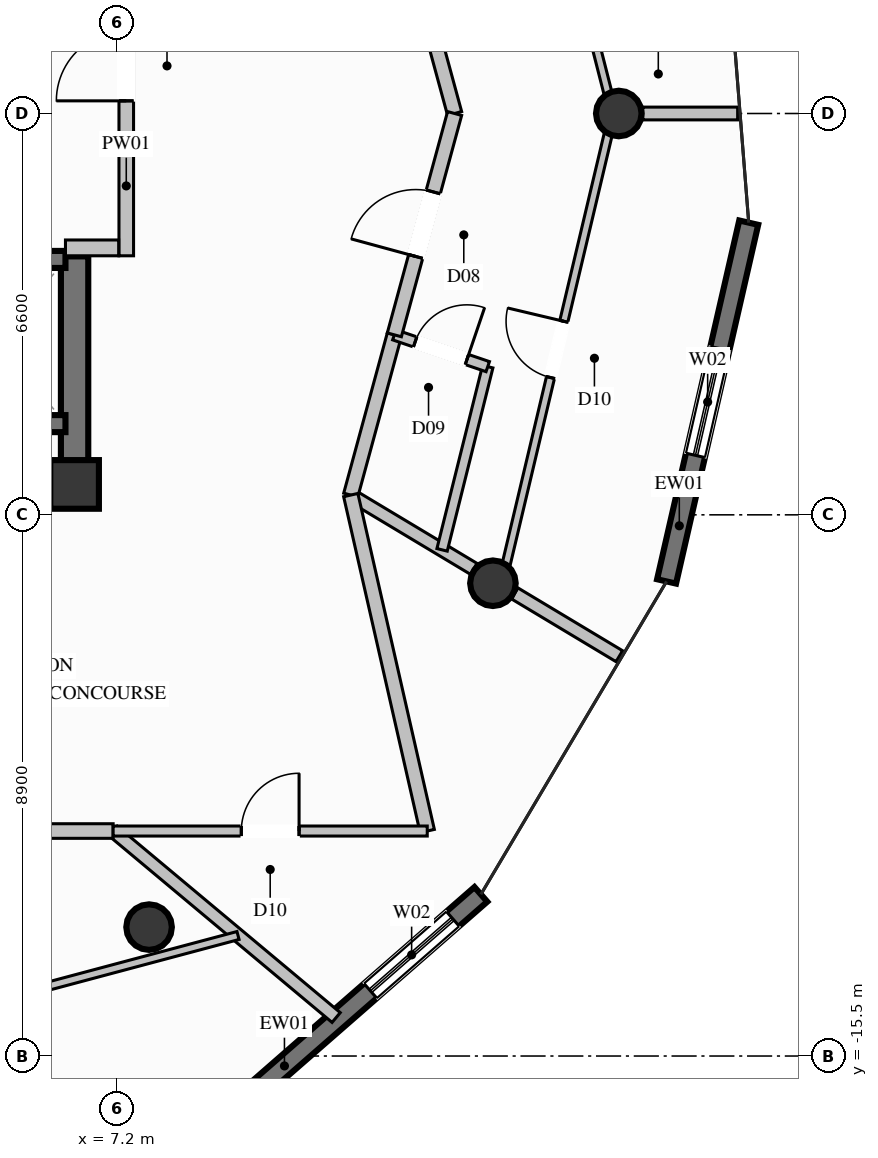
"""IFC4 building model, lengths in metres.
Left out: names, types, materials, properties, quantities, classifications, styles, units other than length and angle.
Written with IfcOpenShell. Run it as: python <this file> out.ifc"""

import sys

from ifc_helpers import new_model, si_unit, direction, frame, frame_2d, origin, origin_2d, place, context, subcontext, project, spatial, rectangle, circle, extrude, element, fill, save


model = new_model("IFC4")
c1 = context("Model", 3, precision=1e-05, world=origin(), true_north=direction((0.0, 1.0)))
c2 = subcontext(c1, "Body", "Model", "MODEL_VIEW")
j1 = project(units=[si_unit("LENGTHUNIT", "METRE"), si_unit("PLANEANGLEUNIT", "RADIAN")], contexts=[c1])
p1 = place(None, origin())
s1 = spatial("IfcSite", under=j1, at=p1, CompositionType="ELEMENT")
p2 = place(p1, origin())
s2 = spatial("IfcBuilding", under=s1, at=p2, CompositionType="ELEMENT")
p3 = place(p2, frame((0.0, 0.0, 246.8)))
s3 = spatial("IfcBuildingStorey", under=s2, at=p3, CompositionType="ELEMENT", Elevation=246.8)
p4 = place(p3, frame((6.5, -6.1, 0.0), z_axis=(0.0, 0.0, 1.0), x_axis=(1.0, 0.0, 0.0)))
e1 = element("IfcColumn", 1, at=p4, inside=s3, PredefinedType="COLUMN", context=c2, shape_type="SweptSolid", body=[
    extrude(rectangle(XDim=0.8, YDim=0.8, at=origin_2d()), origin(), (0.0, 0.0, 1.0), 3.8),
])
p5 = place(p3, frame((4.15, -6.1, 0.0), z_axis=(0.0, 0.0, 1.0), x_axis=(1.0, 0.0, 0.0)))
e2 = element("IfcWall", 2, at=p5, inside=s3, PredefinedType="SHEAR", context=c2, shape_type="SweptSolid", body=[
    extrude(rectangle(XDim=2.125, YDim=0.45, at=frame_2d((1.062, 0.0))), origin(), (0.0, 0.0, 1.0), 3.8),
])
p6 = place(p3, frame((6.5, -6.325, 0.0), z_axis=(0.0, 0.0, 1.0), x_axis=(0.0, 1.0, 0.0)))
e3 = element("IfcWall", 3, at=p6, inside=s3, PredefinedType="SHEAR", context=c2, shape_type="SweptSolid", body=[
    extrude(rectangle(XDim=3.975, YDim=0.45, at=frame_2d((1.987, 0.0))), origin(), (0.0, 0.0, 1.0), 3.8),
])
for number, where, z_axis, x_axis in (
    (4, (15.45, 0.0, 0.0), (0.0, 0.0, 1.0), (1.0, 0.0, 0.0)),
    (5, (7.725, -13.38, 0.0), (0.0, 0.0, 1.0), (1.0, 0.0, 0.0)),
    (6, (13.38, -7.725, 0.0), (0.0, 0.0, 1.0), (1.0, 0.0, 0.0)),
):
    element("IfcColumn", number, at=place(p3, frame(where, z_axis=z_axis, x_axis=x_axis)), inside=s3, PredefinedType="COLUMN", context=c2, shape_type="SweptSolid", body=[
        extrude(circle(Radius=0.375, at=origin_2d()), origin(), (0.0, 0.0, 1.0), 3.8),
    ])
p7 = place(p3, frame((13.182, -12.842, 0.0), z_axis=(0.0, 0.0, 1.0), x_axis=(-0.753243589512, -0.657741662706, 0.0)))
e7 = element("IfcWall", 7, at=p7, inside=s3, PredefinedType="SOLIDWALL", context=c2, shape_type="SweptSolid", body=[
    extrude(rectangle(XDim=5.916, YDim=0.32, at=frame_2d((2.958, 0.0))), origin(), (0.0, 0.0, 1.0), 3.57),
])
p8 = place(p7, frame((0.612, 0.0, 0.35)))
e8 = element("IfcOpeningElement", 8, at=p8, cuts=e7, PredefinedType="OPENING", context=c2, shape_type="SweptSolid", body=[
    extrude(rectangle(XDim=1.8, YDim=2.6, at=frame_2d((0.9, 1.3))), frame((0.0, 0.17, 0.0), z_axis=(0.0, -1.0, 0.0), x_axis=(1.0, 0.0, 0.0)), (0.0, 0.0, 1.0), 0.34),
])
p9 = place(p3, frame((17.587, -1.795, 0.0), z_axis=(0.0, 0.0, 1.0), x_axis=(-0.223174159959, -0.974778587335, 0.0)))
e9 = element("IfcWall", 9, at=p9, inside=s3, PredefinedType="SOLIDWALL", context=c2, shape_type="SweptSolid", body=[
    extrude(rectangle(XDim=6.053, YDim=0.32, at=frame_2d((3.026, 0.0))), origin(), (0.0, 0.0, 1.0), 3.57),
])
p10 = place(p9, frame((2.126, 0.0, 0.35)))
e10 = element("IfcOpeningElement", 10, at=p10, cuts=e9, PredefinedType="OPENING", context=c2, shape_type="SweptSolid", body=[
    extrude(rectangle(XDim=1.8, YDim=2.6, at=frame_2d((0.9, 1.3))), frame((0.0, 0.17, 0.0), z_axis=(0.0, -1.0, 0.0), x_axis=(1.0, 0.0, 0.0)), (0.0, 0.0, 1.0), 0.34),
])
p11 = place(p3, frame((4.15, -5.1, 0.0), z_axis=(0.0, 0.0, 1.0), x_axis=(1.0, 0.0, 0.0)))
e11 = element("IfcWall", 11, at=p11, inside=s3, PredefinedType="SOLIDWALL", context=c2, shape_type="SweptSolid", body=[
    extrude(rectangle(XDim=2.2, YDim=0.28, at=frame_2d((1.1, 0.0))), origin(), (0.0, 0.0, 1.0), 3.57),
])
p12 = place(p3, frame((6.35, -2.4, 0.0), z_axis=(0.0, 0.0, 1.0), x_axis=(-1.0, 0.0, 0.0)))
e12 = element("IfcWall", 12, at=p12, inside=s3, PredefinedType="SOLIDWALL", context=c2, shape_type="SweptSolid", body=[
    extrude(rectangle(XDim=2.2, YDim=0.28, at=frame_2d((1.1, 0.0))), origin(), (0.0, 0.0, 1.0), 3.57),
])
p13 = place(p12, frame((0.5, 0.0, 0.0)))
e13 = element("IfcOpeningElement", 13, at=p13, cuts=e12, PredefinedType="OPENING", context=c2, shape_type="SweptSolid", body=[
    extrude(rectangle(XDim=1.2, YDim=2.2, at=frame_2d((0.6, 1.1))), frame((0.0, 0.15, 0.0), z_axis=(0.0, -1.0, 0.0), x_axis=(1.0, 0.0, 0.0)), (0.0, 0.0, 1.0), 0.3),
])
p14 = place(p3, frame((7.35, -2.34, 0.0), z_axis=(0.0, 0.0, 1.0), x_axis=(0.0, 1.0, 0.0)))
e14 = element("IfcWall", 14, at=p14, inside=s3, PredefinedType="PARTITIONING", context=c2, shape_type="SweptSolid", body=[
    extrude(rectangle(XDim=5.07, YDim=0.24, at=frame_2d((2.535, 0.0))), origin(), (0.0, 0.0, 1.0), 2.655),
])
p15 = place(p14, frame((2.548, 0.0, 0.0)))
e15 = element("IfcOpeningElement", 15, at=p15, cuts=e14, PredefinedType="OPENING", context=c2, shape_type="SweptSolid", body=[
    extrude(rectangle(XDim=1.15, YDim=2.2, at=frame_2d((0.575, 1.1))), frame((0.0, 0.13, 0.0), z_axis=(0.0, -1.0, 0.0), x_axis=(1.0, 0.0, 0.0)), (0.0, 0.0, 1.0), 0.26),
])
p16 = place(p3, frame((6.35, -2.21, 0.0), z_axis=(0.0, 0.0, 1.0), x_axis=(1.0, 0.0, 0.0)))
e16 = element("IfcWall", 16, at=p16, inside=s3, PredefinedType="PARTITIONING", context=c2, shape_type="SweptSolid", body=[
    extrude(rectangle(XDim=0.875, YDim=0.26, at=frame_2d((0.438, 0.0))), origin(), (0.0, 0.0, 1.0), 3.57),
])
p17 = place(p3, frame((11.042, -6.275, 0.0), z_axis=(0.0, 0.0, 1.0), x_axis=(0.857502061287, -0.514480529164, 0.0)))
e17 = element("IfcWall", 17, at=p17, inside=s3, PredefinedType="PARTITIONING", context=c2, shape_type="SweptSolid", body=[
    extrude(rectangle(XDim=2.358, YDim=0.21, at=frame_2d((1.179, 0.0))), origin(), (0.0, 0.0, 1.0), 3.011),
])
p18 = place(p3, frame((13.738, -7.892, 0.0), z_axis=(0.0, 0.0, 1.0), x_axis=(0.857407053578, -0.514638848587, 0.0)))
e18 = element("IfcWall", 18, at=p18, inside=s3, PredefinedType="PARTITIONING", context=c2, shape_type="SweptSolid", body=[
    extrude(rectangle(XDim=2.007, YDim=0.21, at=frame_2d((1.003, 0.0))), origin(), (0.0, 0.0, 1.0), 3.57),
])
p19 = place(p3, frame((11.042, -6.275, 0.0), z_axis=(0.0, 0.0, 1.0), x_axis=(0.262572701387, 0.964912211803, 0.0)))
e19 = element("IfcWall", 19, at=p19, inside=s3, PredefinedType="PARTITIONING", context=c2, shape_type="SweptSolid", body=[
    extrude(rectangle(XDim=2.731, YDim=0.24, at=frame_2d((1.365, 0.0))), origin(), (0.0, 0.0, 1.0), 3.57),
])
p20 = place(p3, frame((12.544, -7.176, 0.0), z_axis=(0.0, 0.0, 1.0), x_axis=(0.241851063072, 0.970313384062, 0.0)))
e20 = element("IfcWall", 20, at=p20, inside=s3, PredefinedType="PLUMBINGWALL", context=c2, shape_type="SweptSolid", body=[
    extrude(rectangle(XDim=3.105, YDim=0.175, at=frame_2d((1.553, 0.0))), origin(), (0.0, 0.0, 1.0), 3.57),
])
p21 = place(p3, frame((11.759, -3.64, 0.0), z_axis=(0.0, 0.0, 1.0), x_axis=(0.946586404748, -0.322450272671, 0.0)))
e21 = element("IfcWall", 21, at=p21, inside=s3, PredefinedType="PLUMBINGWALL", context=c2, shape_type="SweptSolid", body=[
    extrude(rectangle(XDim=1.623, YDim=0.175, at=frame_2d((0.811, 0.0))), origin(), (0.0, 0.0, 1.0), 3.57),
])
p22 = place(p21, frame((0.361, 0.0, 0.0)))
e22 = element("IfcOpeningElement", 22, at=p22, cuts=e21, PredefinedType="OPENING", context=c2, shape_type="SweptSolid", body=[
    extrude(rectangle(XDim=0.9, YDim=2.1, at=frame_2d((0.45, 1.05))), frame((0.0, 0.098, 0.0), z_axis=(0.0, -1.0, 0.0), x_axis=(1.0, 0.0, 0.0)), (0.0, 0.0, 1.0), 0.195),
])
p23 = place(p3, frame((15.845, 0.0, 0.0), z_axis=(0.0, 0.0, 1.0), x_axis=(1.0, 0.0, 0.0)))
e23 = element("IfcWall", 23, at=p23, inside=s3, PredefinedType="PARTITIONING", context=c2, shape_type="SweptSolid", body=[
    extrude(rectangle(XDim=1.56, YDim=0.21, at=frame_2d((0.78, 0.0))), origin(), (0.0, 0.0, 1.0), 3.57),
])
p24 = place(p3, frame((12.75, 0.0, 0.0), z_axis=(0.0, 0.0, 1.0), x_axis=(-0.262640884433, 0.964893655189, 0.0)))
e24 = element("IfcWall", 24, at=p24, inside=s3, PredefinedType="PARTITIONING", context=c2, shape_type="SweptSolid", body=[
    extrude(rectangle(XDim=6.503, YDim=0.24, at=frame_2d((3.251, 0.0))), origin(), (0.0, 0.0, 1.0), 3.57),
])
p25 = place(p3, frame((11.759, -3.64, 0.0), z_axis=(0.0, 0.0, 1.0), x_axis=(0.2626902414, 0.964880219029, 0.0)))
e25 = element("IfcWall", 25, at=p25, inside=s3, PredefinedType="PARTITIONING", context=c2, shape_type="SweptSolid", body=[
    extrude(rectangle(XDim=3.772, YDim=0.24, at=frame_2d((1.886, 0.0))), origin(), (0.0, 0.0, 1.0), 3.57),
])
p26 = place(p25, frame((1.336, 0.0, 0.0)))
e26 = element("IfcOpeningElement", 26, at=p26, cuts=e25, PredefinedType="OPENING", context=c2, shape_type="SweptSolid", body=[
    extrude(rectangle(XDim=1.1, YDim=2.3, at=frame_2d((0.55, 1.15))), frame((0.0, 0.13, 0.0), z_axis=(0.0, -1.0, 0.0), x_axis=(1.0, 0.0, 0.0)), (0.0, 0.0, 1.0), 0.26),
])
p27 = place(p3, frame((13.516, -7.759, 0.0), z_axis=(0.0, 0.0, 1.0), x_axis=(0.230840940032, 0.972991500685, 0.0)))
e27 = element("IfcWall", 27, at=p27, inside=s3, PredefinedType="PARTITIONING", context=c2, shape_type="SweptSolid", body=[
    extrude(rectangle(XDim=7.974, YDim=0.135, at=frame_2d((3.987, 0.0))), origin(), (0.0, 0.0, 1.0), 3.139),
])
p28 = place(p27, frame((3.512, 0.0, 0.0)))
e28 = element("IfcOpeningElement", 28, at=p28, cuts=e27, PredefinedType="OPENING", context=c2, shape_type="SweptSolid", body=[
    extrude(rectangle(XDim=0.95, YDim=2.1, at=frame_2d((0.475, 1.05))), frame((0.0, 0.078, 0.0), z_axis=(0.0, -1.0, 0.0), x_axis=(1.0, 0.0, 0.0)), (0.0, 0.0, 1.0), 0.155),
])
p29 = place(p3, frame((15.357, 0.0, 0.0), z_axis=(0.0, 0.0, 1.0), x_axis=(-0.246948201866, 0.969028681513, 0.0)))
e29 = element("IfcWall", 29, at=p29, inside=s3, PredefinedType="PARTITIONING", context=c2, shape_type="SweptSolid", body=[
    extrude(rectangle(XDim=7.937, YDim=0.135, at=frame_2d((3.968, 0.0))), origin(), (0.0, 0.0, 1.0), 3.139),
])
p30 = place(p29, frame((3.493, 0.0, 0.0)))
e30 = element("IfcOpeningElement", 30, at=p30, cuts=e29, PredefinedType="OPENING", context=c2, shape_type="SweptSolid", body=[
    extrude(rectangle(XDim=0.95, YDim=2.1, at=frame_2d((0.475, 1.05))), frame((0.0, 0.078, 0.0), z_axis=(0.0, -1.0, 0.0), x_axis=(1.0, 0.0, 0.0)), (0.0, 0.0, 1.0), 0.155),
])
p31 = place(p3, frame((7.134, -11.8, 0.0), z_axis=(0.0, 0.0, 1.0), x_axis=(0.767165499913, -0.641449215249, 0.0)))
e31 = element("IfcWall", 31, at=p31, inside=s3, PredefinedType="PARTITIONING", context=c2, shape_type="SweptSolid", body=[
    extrude(rectangle(XDim=4.781, YDim=0.21, at=frame_2d((2.391, 0.0))), origin(), (0.0, 0.0, 1.0), 3.57),
])
p32 = place(p3, frame((0.0, -11.8, 0.0), z_axis=(0.0, 0.0, 1.0), x_axis=(1.0, 0.0, 0.0)))
e32 = element("IfcWall", 32, at=p32, inside=s3, PredefinedType="PARTITIONING", context=c2, shape_type="SweptSolid", body=[
    extrude(rectangle(XDim=7.134, YDim=0.24, at=frame_2d((3.567, 0.0))), origin(), (0.0, 0.0, 1.0), 3.57),
])
p33 = place(p3, frame((0.225, -15.91, 0.0), z_axis=(0.0, 0.0, 1.0), x_axis=(0.966188184598, 0.25783791797, 0.0)))
e33 = element("IfcWall", 33, at=p33, inside=s3, PredefinedType="PARTITIONING", context=c2, shape_type="SweptSolid", body=[
    extrude(rectangle(XDim=9.277, YDim=0.135, at=frame_2d((4.638, 0.0))), origin(), (0.0, 0.0, 1.0), 3.139),
])
p34 = place(p33, frame((4.163, 0.0, 0.0)))
e34 = element("IfcOpeningElement", 34, at=p34, cuts=e33, PredefinedType="OPENING", context=c2, shape_type="SweptSolid", body=[
    extrude(rectangle(XDim=0.95, YDim=2.1, at=frame_2d((0.475, 1.05))), frame((0.0, 0.078, 0.0), z_axis=(0.0, -1.0, 0.0), x_axis=(1.0, 0.0, 0.0)), (0.0, 0.0, 1.0), 0.155),
])
p35 = place(p3, frame((12.3, -11.8, 0.0), z_axis=(0.0, 0.0, 1.0), x_axis=(-0.222014008723, 0.975043475918, 0.0)))
e35 = element("IfcWall", 35, at=p35, inside=s3, PredefinedType="PARTITIONING", context=c2, shape_type="SweptSolid", body=[
    extrude(rectangle(XDim=5.667, YDim=0.24, at=frame_2d((2.833, 0.0))), origin(), (0.0, 0.0, 1.0), 3.57),
])
p36 = place(p3, frame((7.134, -11.8, 0.0), z_axis=(0.0, 0.0, 1.0), x_axis=(1.0, 0.0, 0.0)))
e36 = element("IfcWall", 36, at=p36, inside=s3, PredefinedType="PARTITIONING", context=c2, shape_type="SweptSolid", body=[
    extrude(rectangle(XDim=5.166, YDim=0.165, at=frame_2d((2.583, 0.0))), origin(), (0.0, 0.0, 1.0), 3.57),
])
p37 = place(p36, frame((2.108, 0.0, 0.0)))
e37 = element("IfcOpeningElement", 37, at=p37, cuts=e36, PredefinedType="OPENING", context=c2, shape_type="SweptSolid", body=[
    extrude(rectangle(XDim=0.95, YDim=2.1, at=frame_2d((0.475, 1.05))), frame((0.0, 0.093, 0.0), z_axis=(0.0, -1.0, 0.0), x_axis=(1.0, 0.0, 0.0)), (0.0, 0.0, 1.0), 0.185),
])
p38 = place(p8, origin())
e38 = element("IfcWindow", 38, at=p38, inside=s3, PartitioningType="SINGLE_PANEL", PredefinedType="WINDOW", context=c2, shape_type="SweptSolid", body=[
    extrude(rectangle(XDim=1.8, YDim=2.6, at=frame_2d((0.9, 1.3))), frame((0.0, 0.03, 0.0), z_axis=(0.0, -1.0, 0.0), x_axis=(1.0, 0.0, 0.0)), (0.0, 0.0, 1.0), 0.06),
])
fill(e8, e38)
p39 = place(p10, origin())
e39 = element("IfcWindow", 39, at=p39, inside=s3, PartitioningType="SINGLE_PANEL", PredefinedType="WINDOW", context=c2, shape_type="SweptSolid", body=[
    extrude(rectangle(XDim=1.8, YDim=2.6, at=frame_2d((0.9, 1.3))), frame((0.0, 0.03, 0.0), z_axis=(0.0, -1.0, 0.0), x_axis=(1.0, 0.0, 0.0)), (0.0, 0.0, 1.0), 0.06),
])
fill(e10, e39)
p40 = place(p15, origin())
e40 = element("IfcDoor", 40, at=p40, inside=s3, OperationType="SINGLE_SWING_LEFT", PredefinedType="DOOR", context=c2, shape_type="SweptSolid", body=[
    extrude(rectangle(XDim=1.15, YDim=2.2, at=frame_2d((0.575, 1.1))), frame((0.0, 0.025, 0.0), z_axis=(0.0, -1.0, 0.0), x_axis=(1.0, 0.0, 0.0)), (0.0, 0.0, 1.0), 0.05),
])
fill(e15, e40)
p41 = place(p22, origin())
e41 = element("IfcDoor", 41, at=p41, inside=s3, OperationType="SINGLE_SWING_RIGHT", PredefinedType="DOOR", context=c2, shape_type="SweptSolid", body=[
    extrude(rectangle(XDim=0.9, YDim=2.1, at=frame_2d((0.45, 1.05))), frame((0.0, 0.025, 0.0), z_axis=(0.0, -1.0, 0.0), x_axis=(1.0, 0.0, 0.0)), (0.0, 0.0, 1.0), 0.05),
])
fill(e22, e41)
p42 = place(p26, origin())
e42 = element("IfcDoor", 42, at=p42, inside=s3, OperationType="SINGLE_SWING_LEFT", PredefinedType="DOOR", context=c2, shape_type="SweptSolid", body=[
    extrude(rectangle(XDim=1.1, YDim=2.3, at=frame_2d((0.55, 1.15))), frame((0.0, 0.025, 0.0), z_axis=(0.0, -1.0, 0.0), x_axis=(1.0, 0.0, 0.0)), (0.0, 0.0, 1.0), 0.05),
])
fill(e26, e42)
p43 = place(p28, origin())
e43 = element("IfcDoor", 43, at=p43, inside=s3, OperationType="SINGLE_SWING_RIGHT", PredefinedType="DOOR", context=c2, shape_type="SweptSolid", body=[
    extrude(rectangle(XDim=0.95, YDim=2.1, at=frame_2d((0.475, 1.05))), frame((0.0, 0.025, 0.0), z_axis=(0.0, -1.0, 0.0), x_axis=(1.0, 0.0, 0.0)), (0.0, 0.0, 1.0), 0.05),
])
fill(e28, e43)
p44 = place(p37, origin())
e44 = element("IfcDoor", 44, at=p44, inside=s3, OperationType="SINGLE_SWING_RIGHT", PredefinedType="DOOR", context=c2, shape_type="SweptSolid", body=[
    extrude(rectangle(XDim=0.95, YDim=2.1, at=frame_2d((0.475, 1.05))), frame((0.0, 0.025, 0.0), z_axis=(0.0, -1.0, 0.0), x_axis=(1.0, 0.0, 0.0)), (0.0, 0.0, 1.0), 0.05),
])
fill(e37, e44)
save(model, sys.argv[1])
